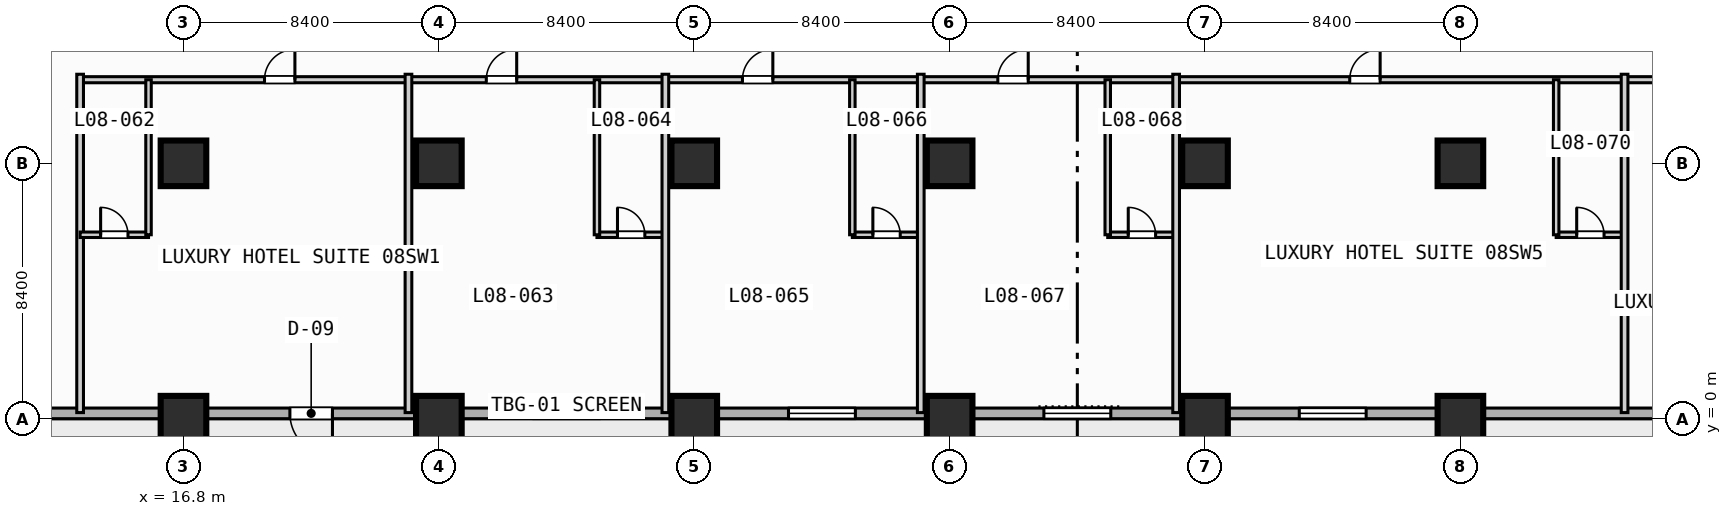
"""IFC4 building model, lengths in metres.
Left out: names, types, materials, properties, quantities, classifications, styles, units other than length and angle.
Written with IfcOpenShell. Run it as: python <this file> out.ifc"""

import sys

from ifc_helpers import new_model, si_unit, direction, frame, frame_2d, origin, origin_2d, place, context, subcontext, project, spatial, rectangle, extrude, element, fill, save


model = new_model("IFC4")
c1 = context("Model", 3, precision=1e-05, world=origin(), true_north=direction((0.0, 1.0)))
c2 = subcontext(c1, "Body", "Model", "MODEL_VIEW")
j1 = project(units=[si_unit("LENGTHUNIT", "METRE"), si_unit("PLANEANGLEUNIT", "RADIAN")], contexts=[c1])
p1 = place(None, origin())
s1 = spatial("IfcSite", under=j1, at=p1, CompositionType="ELEMENT")
p2 = place(p1, origin())
s2 = spatial("IfcBuilding", under=s1, at=p2, CompositionType="ELEMENT")
p3 = place(p2, frame((0.0, 0.0, 39.6)))
s3 = spatial("IfcBuildingStorey", under=s2, at=p3, CompositionType="ELEMENT", Elevation=39.6)
for number, where, z_axis, x_axis in (
    (1, (16.8, 0.0, 0.0), (0.0, 0.0, 1.0), (1.0, 0.0, 0.0)),
    (2, (16.8, 8.4, 0.0), (0.0, 0.0, 1.0), (1.0, 0.0, 0.0)),
    (3, (25.2, 0.0, 0.0), (0.0, 0.0, 1.0), (1.0, 0.0, 0.0)),
    (4, (25.2, 8.4, 0.0), (0.0, 0.0, 1.0), (1.0, 0.0, 0.0)),
    (5, (33.6, 0.0, 0.0), (0.0, 0.0, 1.0), (1.0, 0.0, 0.0)),
    (6, (33.6, 8.4, 0.0), (0.0, 0.0, 1.0), (1.0, 0.0, 0.0)),
    (7, (42.0, 0.0, 0.0), (0.0, 0.0, 1.0), (1.0, 0.0, 0.0)),
    (8, (42.0, 8.4, 0.0), (0.0, 0.0, 1.0), (1.0, 0.0, 0.0)),
    (9, (50.4, 0.0, 0.0), (0.0, 0.0, 1.0), (1.0, 0.0, 0.0)),
    (10, (50.4, 8.4, 0.0), (0.0, 0.0, 1.0), (1.0, 0.0, 0.0)),
    (11, (58.8, 0.0, 0.0), (0.0, 0.0, 1.0), (1.0, 0.0, 0.0)),
    (12, (58.8, 8.4, 0.0), (0.0, 0.0, 1.0), (1.0, 0.0, 0.0)),
):
    element("IfcColumn", number, at=place(p3, frame(where, z_axis=z_axis, x_axis=x_axis)), inside=s3, PredefinedType="COLUMN", context=c2, shape_type="SweptSolid", body=[
        extrude(rectangle(XDim=1.5, YDim=1.5, at=origin_2d()), origin(), (0.0, 0.0, 1.0), 3.8),
    ])
p4 = place(p3, frame((89.225, 0.175, 0.0), z_axis=(0.0, 0.0, 1.0), x_axis=(-1.0, 0.0, 0.0)))
e13 = element("IfcWall", 13, at=p4, inside=s3, PredefinedType="STANDARD", context=c2, shape_type="SweptSolid", body=[
    extrude(rectangle(XDim=86.05, YDim=0.35, at=frame_2d((43.025, 0.0))), origin(), (0.0, 0.0, 1.0), 3.55),
])
p5 = place(p4, frame((67.525, 0.0, 0.0)))
e14 = element("IfcOpeningElement", 14, at=p5, cuts=e13, PredefinedType="OPENING", context=c2, shape_type="SweptSolid", body=[
    extrude(rectangle(XDim=1.4, YDim=2.2, at=frame_2d((0.7, 1.1))), frame((0.0, 0.185, 0.0), z_axis=(0.0, -1.0, 0.0), x_axis=(1.0, 0.0, 0.0)), (0.0, 0.0, 1.0), 0.37),
])
p6 = place(p4, frame((58.725, 0.0, 0.85)))
e15 = element("IfcOpeningElement", 15, at=p6, cuts=e13, PredefinedType="OPENING", context=c2, shape_type="SweptSolid", body=[
    extrude(rectangle(XDim=2.2, YDim=1.8, at=frame_2d((1.1, 0.9))), frame((0.0, 0.185, 0.0), z_axis=(0.0, -1.0, 0.0), x_axis=(1.0, 0.0, 0.0)), (0.0, 0.0, 1.0), 0.37),
])
p7 = place(p4, frame((50.325, 0.0, 0.85)))
e16 = element("IfcOpeningElement", 16, at=p7, cuts=e13, PredefinedType="OPENING", context=c2, shape_type="SweptSolid", body=[
    extrude(rectangle(XDim=2.2, YDim=1.8, at=frame_2d((1.1, 0.9))), frame((0.0, 0.185, 0.0), z_axis=(0.0, -1.0, 0.0), x_axis=(1.0, 0.0, 0.0)), (0.0, 0.0, 1.0), 0.37),
])
p8 = place(p4, frame((41.925, 0.0, 0.85)))
e17 = element("IfcOpeningElement", 17, at=p8, cuts=e13, PredefinedType="OPENING", context=c2, shape_type="SweptSolid", body=[
    extrude(rectangle(XDim=2.2, YDim=1.8, at=frame_2d((1.1, 0.9))), frame((0.0, 0.185, 0.0), z_axis=(0.0, -1.0, 0.0), x_axis=(1.0, 0.0, 0.0)), (0.0, 0.0, 1.0), 0.37),
])
p9 = place(p4, frame((33.525, 0.0, 0.85)))
e18 = element("IfcOpeningElement", 18, at=p9, cuts=e13, PredefinedType="OPENING", context=c2, shape_type="SweptSolid", body=[
    extrude(rectangle(XDim=2.2, YDim=1.8, at=frame_2d((1.1, 0.9))), frame((0.0, 0.185, 0.0), z_axis=(0.0, -1.0, 0.0), x_axis=(1.0, 0.0, 0.0)), (0.0, 0.0, 1.0), 0.37),
])
p10 = place(p4, frame((16.725, 0.0, 0.85)))
e19 = element("IfcOpeningElement", 19, at=p10, cuts=e13, PredefinedType="OPENING", context=c2, shape_type="SweptSolid", body=[
    extrude(rectangle(XDim=2.2, YDim=1.8, at=frame_2d((1.1, 0.9))), frame((0.0, 0.185, 0.0), z_axis=(0.0, -1.0, 0.0), x_axis=(1.0, 0.0, 0.0)), (0.0, 0.0, 1.0), 0.37),
])
p11 = place(p4, frame((8.325, 0.0, 0.85)))
e20 = element("IfcOpeningElement", 20, at=p11, cuts=e13, PredefinedType="OPENING", context=c2, shape_type="SweptSolid", body=[
    extrude(rectangle(XDim=2.2, YDim=1.8, at=frame_2d((1.1, 0.9))), frame((0.0, 0.185, 0.0), z_axis=(0.0, -1.0, 0.0), x_axis=(1.0, 0.0, 0.0)), (0.0, 0.0, 1.0), 0.37),
])
p12 = place(p4, frame((2.4, 0.0, 0.85)))
e21 = element("IfcOpeningElement", 21, at=p12, cuts=e13, PredefinedType="OPENING", context=c2, shape_type="SweptSolid", body=[
    extrude(rectangle(XDim=1.8, YDim=1.8, at=frame_2d((0.9, 0.9))), frame((0.0, 0.185, 0.0), z_axis=(0.0, -1.0, 0.0), x_axis=(1.0, 0.0, 0.0)), (0.0, 0.0, 1.0), 0.37),
])
p13 = place(p3, frame((13.4, 11.15, 0.0), z_axis=(0.0, 0.0, 1.0), x_axis=(1.0, 0.0, 0.0)))
e22 = element("IfcWall", 22, at=p13, inside=s3, PredefinedType="PARTITIONING", context=c2, shape_type="SweptSolid", body=[
    extrude(rectangle(XDim=75.4, YDim=0.2, at=frame_2d((37.7, 0.0))), origin(), (0.0, 0.0, 1.0), 3.55),
])
p14 = place(p13, frame((6.065, 0.0, 0.0)))
e23 = element("IfcOpeningElement", 23, at=p14, cuts=e22, PredefinedType="OPENING", context=c2, shape_type="SweptSolid", body=[
    extrude(rectangle(XDim=1.0, YDim=2.15, at=frame_2d((0.5, 1.075))), frame((0.0, 0.11, 0.0), z_axis=(0.0, -1.0, 0.0), x_axis=(1.0, 0.0, 0.0)), (0.0, 0.0, 1.0), 0.22),
])
p15 = place(p13, frame((13.36, 0.0, 0.0)))
e24 = element("IfcOpeningElement", 24, at=p15, cuts=e22, PredefinedType="OPENING", context=c2, shape_type="SweptSolid", body=[
    extrude(rectangle(XDim=1.0, YDim=2.15, at=frame_2d((0.5, 1.075))), frame((0.0, 0.11, 0.0), z_axis=(0.0, -1.0, 0.0), x_axis=(1.0, 0.0, 0.0)), (0.0, 0.0, 1.0), 0.22),
])
p16 = place(p13, frame((21.785, 0.0, 0.0)))
e25 = element("IfcOpeningElement", 25, at=p16, cuts=e22, PredefinedType="OPENING", context=c2, shape_type="SweptSolid", body=[
    extrude(rectangle(XDim=1.0, YDim=2.15, at=frame_2d((0.5, 1.075))), frame((0.0, 0.11, 0.0), z_axis=(0.0, -1.0, 0.0), x_axis=(1.0, 0.0, 0.0)), (0.0, 0.0, 1.0), 0.22),
])
p17 = place(p13, frame((30.185, 0.0, 0.0)))
e26 = element("IfcOpeningElement", 26, at=p17, cuts=e22, PredefinedType="OPENING", context=c2, shape_type="SweptSolid", body=[
    extrude(rectangle(XDim=1.0, YDim=2.15, at=frame_2d((0.5, 1.075))), frame((0.0, 0.11, 0.0), z_axis=(0.0, -1.0, 0.0), x_axis=(1.0, 0.0, 0.0)), (0.0, 0.0, 1.0), 0.22),
])
p18 = place(p13, frame((41.76, 0.0, 0.0)))
e27 = element("IfcOpeningElement", 27, at=p18, cuts=e22, PredefinedType="OPENING", context=c2, shape_type="SweptSolid", body=[
    extrude(rectangle(XDim=1.0, YDim=2.15, at=frame_2d((0.5, 1.075))), frame((0.0, 0.11, 0.0), z_axis=(0.0, -1.0, 0.0), x_axis=(1.0, 0.0, 0.0)), (0.0, 0.0, 1.0), 0.22),
])
p19 = place(p13, frame((54.36, 0.0, 0.0)))
e28 = element("IfcOpeningElement", 28, at=p19, cuts=e22, PredefinedType="OPENING", context=c2, shape_type="SweptSolid", body=[
    extrude(rectangle(XDim=1.0, YDim=2.15, at=frame_2d((0.5, 1.075))), frame((0.0, 0.11, 0.0), z_axis=(0.0, -1.0, 0.0), x_axis=(1.0, 0.0, 0.0)), (0.0, 0.0, 1.0), 0.22),
])
p20 = place(p13, frame((63.785, 0.0, 0.0)))
e29 = element("IfcOpeningElement", 29, at=p20, cuts=e22, PredefinedType="OPENING", context=c2, shape_type="SweptSolid", body=[
    extrude(rectangle(XDim=1.0, YDim=2.15, at=frame_2d((0.5, 1.075))), frame((0.0, 0.11, 0.0), z_axis=(0.0, -1.0, 0.0), x_axis=(1.0, 0.0, 0.0)), (0.0, 0.0, 1.0), 0.22),
])
p21 = place(p13, frame((70.86, 0.0, 0.0)))
e30 = element("IfcOpeningElement", 30, at=p21, cuts=e22, PredefinedType="OPENING", context=c2, shape_type="SweptSolid", body=[
    extrude(rectangle(XDim=1.0, YDim=2.15, at=frame_2d((0.5, 1.075))), frame((0.0, 0.11, 0.0), z_axis=(0.0, -1.0, 0.0), x_axis=(1.0, 0.0, 0.0)), (0.0, 0.0, 1.0), 0.22),
])
p22 = place(p3, frame((13.4, 0.2, 0.0), z_axis=(0.0, 0.0, 1.0), x_axis=(0.0, 1.0, 0.0)))
e31 = element("IfcWall", 31, at=p22, inside=s3, PredefinedType="PARTITIONING", context=c2, shape_type="SweptSolid", body=[
    extrude(rectangle(XDim=11.13, YDim=0.22, at=frame_2d((5.565, 0.0))), origin(), (0.0, 0.0, 1.0), 3.55),
])
p23 = place(p3, frame((13.4, 6.05, 0.0), z_axis=(0.0, 0.0, 1.0), x_axis=(1.0, 0.0, 0.0)))
e32 = element("IfcWall", 32, at=p23, inside=s3, PredefinedType="PLUMBINGWALL", context=c2, shape_type="SweptSolid", body=[
    extrude(rectangle(XDim=2.25, YDim=0.18, at=frame_2d((1.125, 0.0))), origin(), (0.0, 0.0, 1.0), 3.55),
])
p24 = place(p23, frame((0.675, 0.0, 0.0)))
e33 = element("IfcOpeningElement", 33, at=p24, cuts=e32, PredefinedType="OPENING", context=c2, shape_type="SweptSolid", body=[
    extrude(rectangle(XDim=0.9, YDim=2.1, at=frame_2d((0.45, 1.05))), frame((0.0, 0.1, 0.0), z_axis=(0.0, -1.0, 0.0), x_axis=(1.0, 0.0, 0.0)), (0.0, 0.0, 1.0), 0.2),
])
p25 = place(p3, frame((15.65, 6.05, 0.0), z_axis=(0.0, 0.0, 1.0), x_axis=(0.0, 1.0, 0.0)))
e34 = element("IfcWall", 34, at=p25, inside=s3, PredefinedType="PLUMBINGWALL", context=c2, shape_type="SweptSolid", body=[
    extrude(rectangle(XDim=5.1, YDim=0.18, at=frame_2d((2.55, 0.0))), origin(), (0.0, 0.0, 1.0), 3.55),
])
p26 = place(p3, frame((24.2, 0.2, 0.0), z_axis=(0.0, 0.0, 1.0), x_axis=(0.0, 1.0, 0.0)))
e35 = element("IfcWall", 35, at=p26, inside=s3, PredefinedType="PARTITIONING", context=c2, shape_type="SweptSolid", body=[
    extrude(rectangle(XDim=11.13, YDim=0.22, at=frame_2d((5.565, 0.0))), origin(), (0.0, 0.0, 1.0), 3.55),
])
p27 = place(p3, frame((30.4, 6.05, 0.0), z_axis=(0.0, 0.0, 1.0), x_axis=(1.0, 0.0, 0.0)))
e36 = element("IfcWall", 36, at=p27, inside=s3, PredefinedType="PLUMBINGWALL", context=c2, shape_type="SweptSolid", body=[
    extrude(rectangle(XDim=2.25, YDim=0.18, at=frame_2d((1.125, 0.0))), origin(), (0.0, 0.0, 1.0), 3.55),
])
p28 = place(p27, frame((0.675, 0.0, 0.0)))
e37 = element("IfcOpeningElement", 37, at=p28, cuts=e36, PredefinedType="OPENING", context=c2, shape_type="SweptSolid", body=[
    extrude(rectangle(XDim=0.9, YDim=2.1, at=frame_2d((0.45, 1.05))), frame((0.0, 0.1, 0.0), z_axis=(0.0, -1.0, 0.0), x_axis=(1.0, 0.0, 0.0)), (0.0, 0.0, 1.0), 0.2),
])
p29 = place(p3, frame((30.4, 6.05, 0.0), z_axis=(0.0, 0.0, 1.0), x_axis=(0.0, 1.0, 0.0)))
e38 = element("IfcWall", 38, at=p29, inside=s3, PredefinedType="PLUMBINGWALL", context=c2, shape_type="SweptSolid", body=[
    extrude(rectangle(XDim=5.1, YDim=0.18, at=frame_2d((2.55, 0.0))), origin(), (0.0, 0.0, 1.0), 3.55),
])
p30 = place(p3, frame((32.65, 0.2, 0.0), z_axis=(0.0, 0.0, 1.0), x_axis=(0.0, 1.0, 0.0)))
e39 = element("IfcWall", 39, at=p30, inside=s3, PredefinedType="PARTITIONING", context=c2, shape_type="SweptSolid", body=[
    extrude(rectangle(XDim=11.13, YDim=0.22, at=frame_2d((5.565, 0.0))), origin(), (0.0, 0.0, 1.0), 3.55),
])
p31 = place(p3, frame((38.8, 6.05, 0.0), z_axis=(0.0, 0.0, 1.0), x_axis=(1.0, 0.0, 0.0)))
e40 = element("IfcWall", 40, at=p31, inside=s3, PredefinedType="PLUMBINGWALL", context=c2, shape_type="SweptSolid", body=[
    extrude(rectangle(XDim=2.25, YDim=0.18, at=frame_2d((1.125, 0.0))), origin(), (0.0, 0.0, 1.0), 3.55),
])
p32 = place(p31, frame((0.675, 0.0, 0.0)))
e41 = element("IfcOpeningElement", 41, at=p32, cuts=e40, PredefinedType="OPENING", context=c2, shape_type="SweptSolid", body=[
    extrude(rectangle(XDim=0.9, YDim=2.1, at=frame_2d((0.45, 1.05))), frame((0.0, 0.1, 0.0), z_axis=(0.0, -1.0, 0.0), x_axis=(1.0, 0.0, 0.0)), (0.0, 0.0, 1.0), 0.2),
])
p33 = place(p3, frame((38.8, 6.05, 0.0), z_axis=(0.0, 0.0, 1.0), x_axis=(0.0, 1.0, 0.0)))
e42 = element("IfcWall", 42, at=p33, inside=s3, PredefinedType="PLUMBINGWALL", context=c2, shape_type="SweptSolid", body=[
    extrude(rectangle(XDim=5.1, YDim=0.18, at=frame_2d((2.55, 0.0))), origin(), (0.0, 0.0, 1.0), 3.55),
])
p34 = place(p3, frame((41.05, 0.2, 0.0), z_axis=(0.0, 0.0, 1.0), x_axis=(0.0, 1.0, 0.0)))
e43 = element("IfcWall", 43, at=p34, inside=s3, PredefinedType="PARTITIONING", context=c2, shape_type="SweptSolid", body=[
    extrude(rectangle(XDim=11.13, YDim=0.22, at=frame_2d((5.565, 0.0))), origin(), (0.0, 0.0, 1.0), 3.55),
])
p35 = place(p3, frame((47.2, 6.05, 0.0), z_axis=(0.0, 0.0, 1.0), x_axis=(1.0, 0.0, 0.0)))
e44 = element("IfcWall", 44, at=p35, inside=s3, PredefinedType="PLUMBINGWALL", context=c2, shape_type="SweptSolid", body=[
    extrude(rectangle(XDim=2.25, YDim=0.18, at=frame_2d((1.125, 0.0))), origin(), (0.0, 0.0, 1.0), 3.55),
])
p36 = place(p35, frame((0.675, 0.0, 0.0)))
e45 = element("IfcOpeningElement", 45, at=p36, cuts=e44, PredefinedType="OPENING", context=c2, shape_type="SweptSolid", body=[
    extrude(rectangle(XDim=0.9, YDim=2.1, at=frame_2d((0.45, 1.05))), frame((0.0, 0.1, 0.0), z_axis=(0.0, -1.0, 0.0), x_axis=(1.0, 0.0, 0.0)), (0.0, 0.0, 1.0), 0.2),
])
p37 = place(p3, frame((47.2, 6.05, 0.0), z_axis=(0.0, 0.0, 1.0), x_axis=(0.0, 1.0, 0.0)))
e46 = element("IfcWall", 46, at=p37, inside=s3, PredefinedType="PLUMBINGWALL", context=c2, shape_type="SweptSolid", body=[
    extrude(rectangle(XDim=5.1, YDim=0.18, at=frame_2d((2.55, 0.0))), origin(), (0.0, 0.0, 1.0), 3.55),
])
p38 = place(p3, frame((49.45, 0.2, 0.0), z_axis=(0.0, 0.0, 1.0), x_axis=(0.0, 1.0, 0.0)))
e47 = element("IfcWall", 47, at=p38, inside=s3, PredefinedType="PARTITIONING", context=c2, shape_type="SweptSolid", body=[
    extrude(rectangle(XDim=11.13, YDim=0.22, at=frame_2d((5.565, 0.0))), origin(), (0.0, 0.0, 1.0), 3.55),
])
p39 = place(p3, frame((61.95, 6.05, 0.0), z_axis=(0.0, 0.0, 1.0), x_axis=(1.0, 0.0, 0.0)))
e48 = element("IfcWall", 48, at=p39, inside=s3, PredefinedType="PLUMBINGWALL", context=c2, shape_type="SweptSolid", body=[
    extrude(rectangle(XDim=2.25, YDim=0.18, at=frame_2d((1.125, 0.0))), origin(), (0.0, 0.0, 1.0), 3.55),
])
p40 = place(p39, frame((0.675, 0.0, 0.0)))
e49 = element("IfcOpeningElement", 49, at=p40, cuts=e48, PredefinedType="OPENING", context=c2, shape_type="SweptSolid", body=[
    extrude(rectangle(XDim=0.9, YDim=2.1, at=frame_2d((0.45, 1.05))), frame((0.0, 0.1, 0.0), z_axis=(0.0, -1.0, 0.0), x_axis=(1.0, 0.0, 0.0)), (0.0, 0.0, 1.0), 0.2),
])
p41 = place(p3, frame((61.95, 6.05, 0.0), z_axis=(0.0, 0.0, 1.0), x_axis=(0.0, 1.0, 0.0)))
e50 = element("IfcWall", 50, at=p41, inside=s3, PredefinedType="PLUMBINGWALL", context=c2, shape_type="SweptSolid", body=[
    extrude(rectangle(XDim=5.1, YDim=0.18, at=frame_2d((2.55, 0.0))), origin(), (0.0, 0.0, 1.0), 3.55),
])
p42 = place(p3, frame((64.2, 0.2, 0.0), z_axis=(0.0, 0.0, 1.0), x_axis=(0.0, 1.0, 0.0)))
e51 = element("IfcWall", 51, at=p42, inside=s3, PredefinedType="PARTITIONING", context=c2, shape_type="SweptSolid", body=[
    extrude(rectangle(XDim=11.13, YDim=0.22, at=frame_2d((5.565, 0.0))), origin(), (0.0, 0.0, 1.0), 3.55),
])
p43 = place(p5, origin())
e52 = element("IfcDoor", 52, at=p43, inside=s3, OperationType="SINGLE_SWING_LEFT", PredefinedType="DOOR", context=c2, shape_type="SweptSolid", body=[
    extrude(rectangle(XDim=1.4, YDim=2.2, at=frame_2d((0.7, 1.1))), frame((0.0, 0.025, 0.0), z_axis=(0.0, -1.0, 0.0), x_axis=(1.0, 0.0, 0.0)), (0.0, 0.0, 1.0), 0.05),
])
fill(e14, e52)
p44 = place(p6, origin())
e53 = element("IfcWindow", 53, at=p44, inside=s3, PartitioningType="SINGLE_PANEL", PredefinedType="WINDOW", context=c2, shape_type="SweptSolid", body=[
    extrude(rectangle(XDim=2.2, YDim=1.8, at=frame_2d((1.1, 0.9))), frame((0.0, 0.03, 0.0), z_axis=(0.0, -1.0, 0.0), x_axis=(1.0, 0.0, 0.0)), (0.0, 0.0, 1.0), 0.06),
])
fill(e15, e53)
p45 = place(p7, origin())
e54 = element("IfcWindow", 54, at=p45, inside=s3, PartitioningType="SINGLE_PANEL", PredefinedType="WINDOW", context=c2, shape_type="SweptSolid", body=[
    extrude(rectangle(XDim=2.2, YDim=1.8, at=frame_2d((1.1, 0.9))), frame((0.0, 0.03, 0.0), z_axis=(0.0, -1.0, 0.0), x_axis=(1.0, 0.0, 0.0)), (0.0, 0.0, 1.0), 0.06),
])
fill(e16, e54)
p46 = place(p8, origin())
e55 = element("IfcWindow", 55, at=p46, inside=s3, PartitioningType="SINGLE_PANEL", PredefinedType="WINDOW", context=c2, shape_type="SweptSolid", body=[
    extrude(rectangle(XDim=2.2, YDim=1.8, at=frame_2d((1.1, 0.9))), frame((0.0, 0.03, 0.0), z_axis=(0.0, -1.0, 0.0), x_axis=(1.0, 0.0, 0.0)), (0.0, 0.0, 1.0), 0.06),
])
fill(e17, e55)
p47 = place(p9, origin())
e56 = element("IfcWindow", 56, at=p47, inside=s3, PartitioningType="SINGLE_PANEL", PredefinedType="WINDOW", context=c2, shape_type="SweptSolid", body=[
    extrude(rectangle(XDim=2.2, YDim=1.8, at=frame_2d((1.1, 0.9))), frame((0.0, 0.03, 0.0), z_axis=(0.0, -1.0, 0.0), x_axis=(1.0, 0.0, 0.0)), (0.0, 0.0, 1.0), 0.06),
])
fill(e18, e56)
p48 = place(p14, origin())
e57 = element("IfcDoor", 57, at=p48, inside=s3, OperationType="SINGLE_SWING_RIGHT", PredefinedType="DOOR", context=c2, shape_type="SweptSolid", body=[
    extrude(rectangle(XDim=1.0, YDim=2.15, at=frame_2d((0.5, 1.075))), frame((0.0, 0.025, 0.0), z_axis=(0.0, -1.0, 0.0), x_axis=(1.0, 0.0, 0.0)), (0.0, 0.0, 1.0), 0.05),
])
fill(e23, e57)
p49 = place(p15, origin())
e58 = element("IfcDoor", 58, at=p49, inside=s3, OperationType="SINGLE_SWING_RIGHT", PredefinedType="DOOR", context=c2, shape_type="SweptSolid", body=[
    extrude(rectangle(XDim=1.0, YDim=2.15, at=frame_2d((0.5, 1.075))), frame((0.0, 0.025, 0.0), z_axis=(0.0, -1.0, 0.0), x_axis=(1.0, 0.0, 0.0)), (0.0, 0.0, 1.0), 0.05),
])
fill(e24, e58)
p50 = place(p16, origin())
e59 = element("IfcDoor", 59, at=p50, inside=s3, OperationType="SINGLE_SWING_RIGHT", PredefinedType="DOOR", context=c2, shape_type="SweptSolid", body=[
    extrude(rectangle(XDim=1.0, YDim=2.15, at=frame_2d((0.5, 1.075))), frame((0.0, 0.025, 0.0), z_axis=(0.0, -1.0, 0.0), x_axis=(1.0, 0.0, 0.0)), (0.0, 0.0, 1.0), 0.05),
])
fill(e25, e59)
p51 = place(p17, origin())
e60 = element("IfcDoor", 60, at=p51, inside=s3, OperationType="SINGLE_SWING_RIGHT", PredefinedType="DOOR", context=c2, shape_type="SweptSolid", body=[
    extrude(rectangle(XDim=1.0, YDim=2.15, at=frame_2d((0.5, 1.075))), frame((0.0, 0.025, 0.0), z_axis=(0.0, -1.0, 0.0), x_axis=(1.0, 0.0, 0.0)), (0.0, 0.0, 1.0), 0.05),
])
fill(e26, e60)
p52 = place(p18, origin())
e61 = element("IfcDoor", 61, at=p52, inside=s3, OperationType="SINGLE_SWING_RIGHT", PredefinedType="DOOR", context=c2, shape_type="SweptSolid", body=[
    extrude(rectangle(XDim=1.0, YDim=2.15, at=frame_2d((0.5, 1.075))), frame((0.0, 0.025, 0.0), z_axis=(0.0, -1.0, 0.0), x_axis=(1.0, 0.0, 0.0)), (0.0, 0.0, 1.0), 0.05),
])
fill(e27, e61)
p53 = place(p24, origin())
e62 = element("IfcDoor", 62, at=p53, inside=s3, OperationType="SINGLE_SWING_LEFT", PredefinedType="DOOR", context=c2, shape_type="SweptSolid", body=[
    extrude(rectangle(XDim=0.9, YDim=2.1, at=frame_2d((0.45, 1.05))), frame((0.0, 0.025, 0.0), z_axis=(0.0, -1.0, 0.0), x_axis=(1.0, 0.0, 0.0)), (0.0, 0.0, 1.0), 0.05),
])
fill(e33, e62)
p54 = place(p28, origin())
e63 = element("IfcDoor", 63, at=p54, inside=s3, OperationType="SINGLE_SWING_LEFT", PredefinedType="DOOR", context=c2, shape_type="SweptSolid", body=[
    extrude(rectangle(XDim=0.9, YDim=2.1, at=frame_2d((0.45, 1.05))), frame((0.0, 0.025, 0.0), z_axis=(0.0, -1.0, 0.0), x_axis=(1.0, 0.0, 0.0)), (0.0, 0.0, 1.0), 0.05),
])
fill(e37, e63)
p55 = place(p32, origin())
e64 = element("IfcDoor", 64, at=p55, inside=s3, OperationType="SINGLE_SWING_LEFT", PredefinedType="DOOR", context=c2, shape_type="SweptSolid", body=[
    extrude(rectangle(XDim=0.9, YDim=2.1, at=frame_2d((0.45, 1.05))), frame((0.0, 0.025, 0.0), z_axis=(0.0, -1.0, 0.0), x_axis=(1.0, 0.0, 0.0)), (0.0, 0.0, 1.0), 0.05),
])
fill(e41, e64)
p56 = place(p36, origin())
e65 = element("IfcDoor", 65, at=p56, inside=s3, OperationType="SINGLE_SWING_LEFT", PredefinedType="DOOR", context=c2, shape_type="SweptSolid", body=[
    extrude(rectangle(XDim=0.9, YDim=2.1, at=frame_2d((0.45, 1.05))), frame((0.0, 0.025, 0.0), z_axis=(0.0, -1.0, 0.0), x_axis=(1.0, 0.0, 0.0)), (0.0, 0.0, 1.0), 0.05),
])
fill(e45, e65)
p57 = place(p40, origin())
e66 = element("IfcDoor", 66, at=p57, inside=s3, OperationType="SINGLE_SWING_LEFT", PredefinedType="DOOR", context=c2, shape_type="SweptSolid", body=[
    extrude(rectangle(XDim=0.9, YDim=2.1, at=frame_2d((0.45, 1.05))), frame((0.0, 0.025, 0.0), z_axis=(0.0, -1.0, 0.0), x_axis=(1.0, 0.0, 0.0)), (0.0, 0.0, 1.0), 0.05),
])
fill(e49, e66)
save(model, sys.argv[1])
